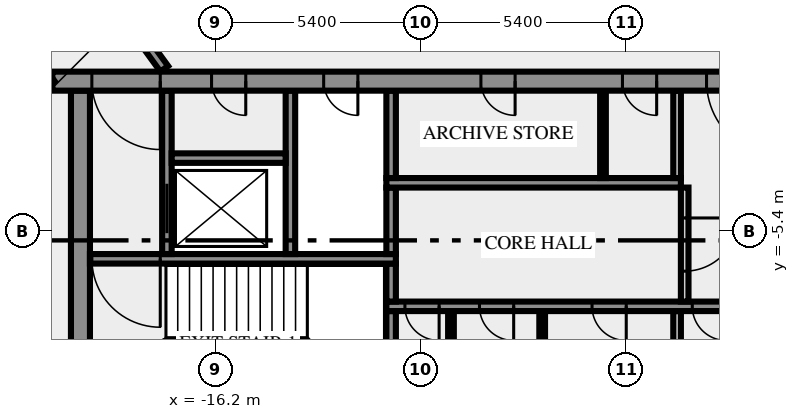
"""IFC4 building model, lengths in metres.
Left out: names, types, materials, properties, quantities, classifications, styles, units other than length and angle.
Written with IfcOpenShell. Run it as: python <this file> out.ifc"""

import sys

from ifc_helpers import new_model, si_unit, direction, frame, frame_2d, origin, place, context, subcontext, project, spatial, rectangle, extrude, element, fill, save


model = new_model("IFC4")
c1 = context("Model", 3, precision=1e-05, world=origin(), true_north=direction((0.0, 1.0)))
c2 = subcontext(c1, "Body", "Model", "MODEL_VIEW")
j1 = project(units=[si_unit("LENGTHUNIT", "METRE"), si_unit("PLANEANGLEUNIT", "RADIAN")], contexts=[c1])
p1 = place(None, origin())
s1 = spatial("IfcSite", under=j1, at=p1, CompositionType="ELEMENT")
p2 = place(p1, origin())
s2 = spatial("IfcBuilding", under=s1, at=p2, CompositionType="ELEMENT")
p3 = place(p2, frame((0.0, 0.0, 160.0)))
s3 = spatial("IfcBuildingStorey", under=s2, at=p3, CompositionType="ELEMENT", Elevation=160.0)
p4 = place(p3, frame((-19.75, -10.5, 0.0), z_axis=(0.0, 0.0, 1.0), x_axis=(0.0, 1.0, 0.0)))
e1 = element("IfcWall", 1, at=p4, inside=s3, PredefinedType="SHEAR", context=c2, shape_type="SweptSolid", body=[
    extrude(rectangle(XDim=8.8, YDim=0.5, at=frame_2d((4.4, 0.0))), origin(), (0.0, 0.0, 1.0), 3.65),
])
p5 = place(p3, frame((-11.575, -10.5, 0.0), z_axis=(0.0, 0.0, 1.0), x_axis=(0.0, 1.0, 0.0)))
e2 = element("IfcWall", 2, at=p5, inside=s3, PredefinedType="SHEAR", context=c2, shape_type="SweptSolid", body=[
    extrude(rectangle(XDim=3.0, YDim=0.25, at=frame_2d((1.5, 0.0))), origin(), (0.0, 0.0, 1.0), 3.65),
])
for number, where, z_axis, x_axis in (
    (3, (-10.0, -10.5, 0.0), (0.0, 0.0, 1.0), (0.0, 1.0, 0.0)),
    (4, (-7.6, -10.5, 0.0), (0.0, 0.0, 1.0), (0.0, 1.0, 0.0)),
):
    element("IfcWall", number, at=place(p3, frame(where, z_axis=z_axis, x_axis=x_axis)), inside=s3, PredefinedType="PARTITIONING", context=c2, shape_type="SweptSolid", body=[
        extrude(rectangle(XDim=3.0, YDim=0.15, at=frame_2d((1.5, 0.0))), origin(), (0.0, 0.0, 1.0), 3.65),
    ])
p6 = place(p3, frame((-4.05, -10.5, 0.0), z_axis=(0.0, 0.0, 1.0), x_axis=(0.0, 1.0, 0.0)))
e5 = element("IfcWall", 5, at=p6, inside=s3, PredefinedType="SOLIDWALL", context=c2, shape_type="SweptSolid", body=[
    extrude(rectangle(XDim=3.0, YDim=0.2, at=frame_2d((1.5, 0.0))), origin(), (0.0, 0.0, 1.0), 3.65),
])
p7 = place(p3, frame((11.7, -7.375, 0.0), z_axis=(0.0, 0.0, 1.0), x_axis=(-1.0, 0.0, 0.0)))
e6 = element("IfcWall", 6, at=p7, inside=s3, PredefinedType="SHEAR", context=c2, shape_type="SweptSolid", body=[
    extrude(rectangle(XDim=23.4, YDim=0.25, at=frame_2d((11.7, 0.0))), origin(), (0.0, 0.0, 1.0), 3.65),
])
p8 = place(p7, frame((22.012, 0.0, 0.0)))
e7 = element("IfcOpeningElement", 7, at=p8, cuts=e6, PredefinedType="OPENING", context=c2, shape_type="SweptSolid", body=[
    extrude(rectangle(XDim=0.9, YDim=2.1, at=frame_2d((0.45, 1.05))), frame((0.0, 0.135, 0.0), z_axis=(0.0, -1.0, 0.0), x_axis=(1.0, 0.0, 0.0)), (0.0, 0.0, 1.0), 0.27),
])
p9 = place(p7, frame((20.05, 0.0, 0.0)))
e8 = element("IfcOpeningElement", 8, at=p9, cuts=e6, PredefinedType="OPENING", context=c2, shape_type="SweptSolid", body=[
    extrude(rectangle(XDim=0.9, YDim=2.1, at=frame_2d((0.45, 1.05))), frame((0.0, 0.135, 0.0), z_axis=(0.0, -1.0, 0.0), x_axis=(1.0, 0.0, 0.0)), (0.0, 0.0, 1.0), 0.27),
])
p10 = place(p7, frame((17.088, 0.0, 0.0)))
e9 = element("IfcOpeningElement", 9, at=p10, cuts=e6, PredefinedType="OPENING", context=c2, shape_type="SweptSolid", body=[
    extrude(rectangle(XDim=0.9, YDim=2.1, at=frame_2d((0.45, 1.05))), frame((0.0, 0.135, 0.0), z_axis=(0.0, -1.0, 0.0), x_axis=(1.0, 0.0, 0.0)), (0.0, 0.0, 1.0), 0.27),
])
p11 = place(p7, frame((14.45, 0.0, 0.0)))
e10 = element("IfcOpeningElement", 10, at=p11, cuts=e6, PredefinedType="OPENING", context=c2, shape_type="SweptSolid", body=[
    extrude(rectangle(XDim=0.9, YDim=2.1, at=frame_2d((0.45, 1.05))), frame((0.0, 0.135, 0.0), z_axis=(0.0, -1.0, 0.0), x_axis=(1.0, 0.0, 0.0)), (0.0, 0.0, 1.0), 0.27),
])
p12 = place(p7, frame((12.95, 0.0, 0.0)))
e11 = element("IfcOpeningElement", 11, at=p12, cuts=e6, PredefinedType="OPENING", context=c2, shape_type="SweptSolid", body=[
    extrude(rectangle(XDim=0.9, YDim=2.1, at=frame_2d((0.45, 1.05))), frame((0.0, 0.135, 0.0), z_axis=(0.0, -1.0, 0.0), x_axis=(1.0, 0.0, 0.0)), (0.0, 0.0, 1.0), 0.27),
])
p13 = place(p7, frame((11.475, 0.0, 0.0)))
e12 = element("IfcOpeningElement", 12, at=p13, cuts=e6, PredefinedType="OPENING", context=c2, shape_type="SweptSolid", body=[
    extrude(rectangle(XDim=0.9, YDim=2.1, at=frame_2d((0.45, 1.05))), frame((0.0, 0.135, 0.0), z_axis=(0.0, -1.0, 0.0), x_axis=(1.0, 0.0, 0.0)), (0.0, 0.0, 1.0), 0.27),
])
p14 = place(p7, frame((10.45, 0.0, 0.0)))
e13 = element("IfcOpeningElement", 13, at=p14, cuts=e6, PredefinedType="OPENING", context=c2, shape_type="SweptSolid", body=[
    extrude(rectangle(XDim=0.5, YDim=2.1, at=frame_2d((0.25, 1.05))), frame((0.0, 0.135, 0.0), z_axis=(0.0, -1.0, 0.0), x_axis=(1.0, 0.0, 0.0)), (0.0, 0.0, 1.0), 0.27),
])
p15 = place(p7, frame((8.35, 0.0, 0.0)))
e14 = element("IfcOpeningElement", 14, at=p15, cuts=e6, PredefinedType="OPENING", context=c2, shape_type="SweptSolid", body=[
    extrude(rectangle(XDim=1.1, YDim=2.1, at=frame_2d((0.55, 1.05))), frame((0.0, 0.135, 0.0), z_axis=(0.0, -1.0, 0.0), x_axis=(1.0, 0.0, 0.0)), (0.0, 0.0, 1.0), 0.27),
])
p16 = place(p7, frame((5.85, 0.0, 0.0)))
e15 = element("IfcOpeningElement", 15, at=p16, cuts=e6, PredefinedType="OPENING", context=c2, shape_type="SweptSolid", body=[
    extrude(rectangle(XDim=1.1, YDim=2.1, at=frame_2d((0.55, 1.05))), frame((0.0, 0.135, 0.0), z_axis=(0.0, -1.0, 0.0), x_axis=(1.0, 0.0, 0.0)), (0.0, 0.0, 1.0), 0.27),
])
p17 = place(p7, frame((3.35, 0.0, 0.0)))
e16 = element("IfcOpeningElement", 16, at=p17, cuts=e6, PredefinedType="OPENING", context=c2, shape_type="SweptSolid", body=[
    extrude(rectangle(XDim=1.1, YDim=2.1, at=frame_2d((0.55, 1.05))), frame((0.0, 0.135, 0.0), z_axis=(0.0, -1.0, 0.0), x_axis=(1.0, 0.0, 0.0)), (0.0, 0.0, 1.0), 0.27),
])
p18 = place(p7, frame((0.85, 0.0, 0.0)))
e17 = element("IfcOpeningElement", 17, at=p18, cuts=e6, PredefinedType="OPENING", context=c2, shape_type="SweptSolid", body=[
    extrude(rectangle(XDim=1.1, YDim=2.1, at=frame_2d((0.55, 1.05))), frame((0.0, 0.135, 0.0), z_axis=(0.0, -1.0, 0.0), x_axis=(1.0, 0.0, 0.0)), (0.0, 0.0, 1.0), 0.27),
])
p19 = place(p3, frame((-11.575, -7.25, 0.0), z_axis=(0.0, 0.0, 1.0), x_axis=(0.0, 1.0, 0.0)))
e18 = element("IfcWall", 18, at=p19, inside=s3, PredefinedType="SHEAR", context=c2, shape_type="SweptSolid", body=[
    extrude(rectangle(XDim=1.0, YDim=0.25, at=frame_2d((0.5, 0.0))), origin(), (0.0, 0.0, 1.0), 3.65),
])
p20 = place(p3, frame((-3.85, -4.25, 0.0), z_axis=(0.0, 0.0, 1.0), x_axis=(0.0, -1.0, 0.0)))
e19 = element("IfcWall", 19, at=p20, inside=s3, PredefinedType="SOLIDWALL", context=c2, shape_type="SweptSolid", body=[
    extrude(rectangle(XDim=3.0, YDim=0.2, at=frame_2d((1.5, 0.0))), origin(), (0.0, 0.0, 1.0), 3.65),
])
p21 = place(p20, frame((0.8, 0.0, 0.0)))
e20 = element("IfcOpeningElement", 20, at=p21, cuts=e19, PredefinedType="OPENING", context=c2, shape_type="SweptSolid", body=[
    extrude(rectangle(XDim=1.4, YDim=2.1, at=frame_2d((0.7, 1.05))), frame((0.0, 0.11, 0.0), z_axis=(0.0, -1.0, 0.0), x_axis=(1.0, 0.0, 0.0)), (0.0, 0.0, 1.0), 0.22),
])
p22 = place(p3, frame((-11.45, -6.125, 0.0), z_axis=(0.0, 0.0, 1.0), x_axis=(-1.0, 0.0, 0.0)))
e21 = element("IfcWall", 21, at=p22, inside=s3, PredefinedType="SHEAR", context=c2, shape_type="SweptSolid", body=[
    extrude(rectangle(XDim=8.05, YDim=0.25, at=frame_2d((4.025, 0.0))), origin(), (0.0, 0.0, 1.0), 3.65),
])
p23 = place(p22, frame((6.2, 0.0, 0.0)))
e22 = element("IfcOpeningElement", 22, at=p23, cuts=e21, PredefinedType="OPENING", context=c2, shape_type="SweptSolid", body=[
    extrude(rectangle(XDim=1.8, YDim=2.1, at=frame_2d((0.9, 1.05))), frame((0.0, 0.135, 0.0), z_axis=(0.0, -1.0, 0.0), x_axis=(1.0, 0.0, 0.0)), (0.0, 0.0, 1.0), 0.27),
])
p24 = place(p3, frame((-17.475, -6.0, 0.0), z_axis=(0.0, 0.0, 1.0), x_axis=(0.0, 1.0, 0.0)))
e23 = element("IfcWall", 23, at=p24, inside=s3, PredefinedType="SHEAR", context=c2, shape_type="SweptSolid", body=[
    extrude(rectangle(XDim=4.3, YDim=0.25, at=frame_2d((2.15, 0.0))), origin(), (0.0, 0.0, 1.0), 3.65),
])
p25 = place(p24, frame((0.55, 0.0, 0.0)))
e24 = element("IfcOpeningElement", 24, at=p25, cuts=e23, PredefinedType="OPENING", context=c2, shape_type="SweptSolid", body=[
    extrude(rectangle(XDim=1.3, YDim=2.1, at=frame_2d((0.65, 1.05))), frame((0.0, 0.135, 0.0), z_axis=(0.0, -1.0, 0.0), x_axis=(1.0, 0.0, 0.0)), (0.0, 0.0, 1.0), 0.27),
])
p26 = place(p3, frame((-14.225, -6.0, 0.0), z_axis=(0.0, 0.0, 1.0), x_axis=(0.0, 1.0, 0.0)))
e25 = element("IfcWall", 25, at=p26, inside=s3, PredefinedType="SHEAR", context=c2, shape_type="SweptSolid", body=[
    extrude(rectangle(XDim=4.3, YDim=0.25, at=frame_2d((2.15, 0.0))), origin(), (0.0, 0.0, 1.0), 3.65),
])
p27 = place(p3, frame((-11.575, -6.0, 0.0), z_axis=(0.0, 0.0, 1.0), x_axis=(0.0, 1.0, 0.0)))
e26 = element("IfcWall", 26, at=p27, inside=s3, PredefinedType="SHEAR", context=c2, shape_type="SweptSolid", body=[
    extrude(rectangle(XDim=1.75, YDim=0.25, at=frame_2d((0.875, 0.0))), origin(), (0.0, 0.0, 1.0), 3.65),
])
p28 = place(p3, frame((-11.7, -4.125, 0.0), z_axis=(0.0, 0.0, 1.0), x_axis=(1.0, 0.0, 0.0)))
e27 = element("IfcWall", 27, at=p28, inside=s3, PredefinedType="SHEAR", context=c2, shape_type="SweptSolid", body=[
    extrude(rectangle(XDim=7.75, YDim=0.25, at=frame_2d((3.875, 0.0))), origin(), (0.0, 0.0, 1.0), 3.65),
])
p29 = place(p3, frame((-11.575, -4.0, 0.0), z_axis=(0.0, 0.0, 1.0), x_axis=(0.0, 1.0, 0.0)))
e28 = element("IfcWall", 28, at=p29, inside=s3, PredefinedType="SHEAR", context=c2, shape_type="SweptSolid", body=[
    extrude(rectangle(XDim=2.3, YDim=0.25, at=frame_2d((1.15, 0.0))), origin(), (0.0, 0.0, 1.0), 3.65),
])
p30 = place(p3, frame((-6.0, -4.0, 0.0), z_axis=(0.0, 0.0, 1.0), x_axis=(0.0, 1.0, 0.0)))
e29 = element("IfcWall", 29, at=p30, inside=s3, PredefinedType="PARTITIONING", context=c2, shape_type="SweptSolid", body=[
    extrude(rectangle(XDim=2.3, YDim=0.15, at=frame_2d((1.15, 0.0))), origin(), (0.0, 0.0, 1.0), 3.65),
])
p31 = place(p3, frame((-4.05, -4.0, 0.0), z_axis=(0.0, 0.0, 1.0), x_axis=(0.0, 1.0, 0.0)))
e30 = element("IfcWall", 30, at=p31, inside=s3, PredefinedType="SOLIDWALL", context=c2, shape_type="SweptSolid", body=[
    extrude(rectangle(XDim=2.3, YDim=0.2, at=frame_2d((1.15, 0.0))), origin(), (0.0, 0.0, 1.0), 3.65),
])
p32 = place(p3, frame((-17.35, -3.475, 0.0), z_axis=(0.0, 0.0, 1.0), x_axis=(1.0, 0.0, 0.0)))
e31 = element("IfcWall", 31, at=p32, inside=s3, PredefinedType="SHEAR", context=c2, shape_type="SweptSolid", body=[
    extrude(rectangle(XDim=3.0, YDim=0.25, at=frame_2d((1.5, 0.0))), origin(), (0.0, 0.0, 1.0), 3.65),
])
p33 = place(p3, frame((20.49, -1.45, 0.0), z_axis=(0.0, 0.0, 1.0), x_axis=(-1.0, 0.0, 0.0)))
e32 = element("IfcWall", 32, at=p33, inside=s3, PredefinedType="SHEAR", context=c2, shape_type="SweptSolid", body=[
    extrude(rectangle(XDim=40.98, YDim=0.5, at=frame_2d((20.49, 0.0))), origin(), (0.0, 0.0, 1.0), 3.65),
])
p34 = place(p33, frame((38.14, 0.0, 0.0)))
e33 = element("IfcOpeningElement", 33, at=p34, cuts=e32, PredefinedType="OPENING", context=c2, shape_type="SweptSolid", body=[
    extrude(rectangle(XDim=1.8, YDim=2.1, at=frame_2d((0.9, 1.05))), frame((0.0, 0.26, 0.0), z_axis=(0.0, -1.0, 0.0), x_axis=(1.0, 0.0, 0.0)), (0.0, 0.0, 1.0), 0.52),
])
p35 = place(p33, frame((35.89, 0.0, 0.0)))
e34 = element("IfcOpeningElement", 34, at=p35, cuts=e32, PredefinedType="OPENING", context=c2, shape_type="SweptSolid", body=[
    extrude(rectangle(XDim=0.9, YDim=2.1, at=frame_2d((0.45, 1.05))), frame((0.0, 0.26, 0.0), z_axis=(0.0, -1.0, 0.0), x_axis=(1.0, 0.0, 0.0)), (0.0, 0.0, 1.0), 0.52),
])
p36 = place(p33, frame((32.94, 0.0, 0.0)))
e35 = element("IfcOpeningElement", 35, at=p36, cuts=e32, PredefinedType="OPENING", context=c2, shape_type="SweptSolid", body=[
    extrude(rectangle(XDim=0.9, YDim=2.1, at=frame_2d((0.45, 1.05))), frame((0.0, 0.26, 0.0), z_axis=(0.0, -1.0, 0.0), x_axis=(1.0, 0.0, 0.0)), (0.0, 0.0, 1.0), 0.52),
])
p37 = place(p33, frame((28.802, 0.0, 0.0)))
e36 = element("IfcOpeningElement", 36, at=p37, cuts=e32, PredefinedType="OPENING", context=c2, shape_type="SweptSolid", body=[
    extrude(rectangle(XDim=0.9, YDim=2.1, at=frame_2d((0.45, 1.05))), frame((0.0, 0.26, 0.0), z_axis=(0.0, -1.0, 0.0), x_axis=(1.0, 0.0, 0.0)), (0.0, 0.0, 1.0), 0.52),
])
p38 = place(p33, frame((25.077, 0.0, 0.0)))
e37 = element("IfcOpeningElement", 37, at=p38, cuts=e32, PredefinedType="OPENING", context=c2, shape_type="SweptSolid", body=[
    extrude(rectangle(XDim=0.9, YDim=2.1, at=frame_2d((0.45, 1.05))), frame((0.0, 0.26, 0.0), z_axis=(0.0, -1.0, 0.0), x_axis=(1.0, 0.0, 0.0)), (0.0, 0.0, 1.0), 0.52),
])
p39 = place(p33, frame((21.765, 0.0, 0.0)))
e38 = element("IfcOpeningElement", 38, at=p39, cuts=e32, PredefinedType="OPENING", context=c2, shape_type="SweptSolid", body=[
    extrude(rectangle(XDim=2.0, YDim=2.1, at=frame_2d((1.0, 1.05))), frame((0.0, 0.26, 0.0), z_axis=(0.0, -1.0, 0.0), x_axis=(1.0, 0.0, 0.0)), (0.0, 0.0, 1.0), 0.52),
])
p40 = place(p33, frame((7.14, 0.0, 0.0)))
e39 = element("IfcOpeningElement", 39, at=p40, cuts=e32, PredefinedType="OPENING", context=c2, shape_type="SweptSolid", body=[
    extrude(rectangle(XDim=0.9, YDim=2.1, at=frame_2d((0.45, 1.05))), frame((0.0, 0.26, 0.0), z_axis=(0.0, -1.0, 0.0), x_axis=(1.0, 0.0, 0.0)), (0.0, 0.0, 1.0), 0.52),
])
p41 = place(p33, frame((5.028, 0.0, 0.0)))
e40 = element("IfcOpeningElement", 40, at=p41, cuts=e32, PredefinedType="OPENING", context=c2, shape_type="SweptSolid", body=[
    extrude(rectangle(XDim=0.8, YDim=2.1, at=frame_2d((0.4, 1.05))), frame((0.0, 0.26, 0.0), z_axis=(0.0, -1.0, 0.0), x_axis=(1.0, 0.0, 0.0)), (0.0, 0.0, 1.0), 0.52),
])
p42 = place(p33, frame((3.452, 0.0, 0.0)))
e41 = element("IfcOpeningElement", 41, at=p42, cuts=e32, PredefinedType="OPENING", context=c2, shape_type="SweptSolid", body=[
    extrude(rectangle(XDim=0.8, YDim=2.1, at=frame_2d((0.4, 1.05))), frame((0.0, 0.26, 0.0), z_axis=(0.0, -1.0, 0.0), x_axis=(1.0, 0.0, 0.0)), (0.0, 0.0, 1.0), 0.52),
])
p43 = place(p33, frame((1.04, 0.0, 0.0)))
e42 = element("IfcOpeningElement", 42, at=p43, cuts=e32, PredefinedType="OPENING", context=c2, shape_type="SweptSolid", body=[
    extrude(rectangle(XDim=1.8, YDim=2.1, at=frame_2d((0.9, 1.05))), frame((0.0, 0.26, 0.0), z_axis=(0.0, -1.0, 0.0), x_axis=(1.0, 0.0, 0.0)), (0.0, 0.0, 1.0), 0.52),
])
p44 = place(p3, frame((-20.531, -1.523, 0.0), z_axis=(0.0, 0.0, 1.0), x_axis=(-0.587781654618, 0.809019608226, 0.0)))
e43 = element("IfcWall", 43, at=p44, inside=s3, PredefinedType="SOLIDWALL", context=c2, shape_type="SweptSolid", body=[
    extrude(rectangle(XDim=33.911, YDim=0.25, at=frame_2d((16.956, 0.0))), origin(), (0.0, 0.0, 1.0), 3.65),
])
p45 = place(p44, frame((19.743, 0.0, 0.0)))
e44 = element("IfcOpeningElement", 44, at=p45, cuts=e43, PredefinedType="OPENING", context=c2, shape_type="SweptSolid", body=[
    extrude(rectangle(XDim=1.8, YDim=2.1, at=frame_2d((0.9, 1.05))), frame((0.0, 0.135, 0.0), z_axis=(0.0, -1.0, 0.0), x_axis=(1.0, 0.0, 0.0)), (0.0, 0.0, 1.0), 0.27),
])
p46 = place(p44, frame((0.533, 0.0, 0.0)))
e45 = element("IfcOpeningElement", 45, at=p46, cuts=e43, PredefinedType="OPENING", context=c2, shape_type="SweptSolid", body=[
    extrude(rectangle(XDim=0.9, YDim=2.1, at=frame_2d((0.45, 1.05))), frame((0.0, 0.135, 0.0), z_axis=(0.0, -1.0, 0.0), x_axis=(1.0, 0.0, 0.0)), (0.0, 0.0, 1.0), 0.27),
])
p47 = place(p3, frame((-38.32, 27.469, 0.0), z_axis=(0.0, 0.0, 1.0), x_axis=(0.587788021768, -0.809014982226, 0.0)))
e46 = element("IfcWall", 46, at=p47, inside=s3, PredefinedType="SOLIDWALL", context=c2, shape_type="SweptSolid", body=[
    extrude(rectangle(XDim=35.344, YDim=0.25, at=frame_2d((17.672, 0.0))), origin(), (0.0, 0.0, 1.0), 3.65),
])
p48 = place(p47, frame((31.003, 0.0, 0.0)))
e47 = element("IfcOpeningElement", 47, at=p48, cuts=e46, PredefinedType="OPENING", context=c2, shape_type="SweptSolid", body=[
    extrude(rectangle(XDim=0.9, YDim=2.1, at=frame_2d((0.45, 1.05))), frame((0.0, 0.135, 0.0), z_axis=(0.0, -1.0, 0.0), x_axis=(1.0, 0.0, 0.0)), (0.0, 0.0, 1.0), 0.27),
])
p49 = place(p47, frame((16.687, 0.0, 0.0)))
e48 = element("IfcOpeningElement", 48, at=p49, cuts=e46, PredefinedType="OPENING", context=c2, shape_type="SweptSolid", body=[
    extrude(rectangle(XDim=0.9, YDim=2.1, at=frame_2d((0.45, 1.05))), frame((0.0, 0.135, 0.0), z_axis=(0.0, -1.0, 0.0), x_axis=(1.0, 0.0, 0.0)), (0.0, 0.0, 1.0), 0.27),
])
p50 = place(p8, origin())
e49 = element("IfcDoor", 49, at=p50, inside=s3, OperationType="SINGLE_SWING_RIGHT", PredefinedType="DOOR", context=c2, shape_type="SweptSolid", body=[
    extrude(rectangle(XDim=0.9, YDim=2.1, at=frame_2d((0.45, 1.05))), frame((0.0, 0.025, 0.0), z_axis=(0.0, -1.0, 0.0), x_axis=(1.0, 0.0, 0.0)), (0.0, 0.0, 1.0), 0.05),
])
fill(e7, e49)
p51 = place(p9, origin())
e50 = element("IfcDoor", 50, at=p51, inside=s3, OperationType="SINGLE_SWING_RIGHT", PredefinedType="DOOR", context=c2, shape_type="SweptSolid", body=[
    extrude(rectangle(XDim=0.9, YDim=2.1, at=frame_2d((0.45, 1.05))), frame((0.0, 0.025, 0.0), z_axis=(0.0, -1.0, 0.0), x_axis=(1.0, 0.0, 0.0)), (0.0, 0.0, 1.0), 0.05),
])
fill(e8, e50)
p52 = place(p10, origin())
e51 = element("IfcDoor", 51, at=p52, inside=s3, OperationType="SINGLE_SWING_RIGHT", PredefinedType="DOOR", context=c2, shape_type="SweptSolid", body=[
    extrude(rectangle(XDim=0.9, YDim=2.1, at=frame_2d((0.45, 1.05))), frame((0.0, 0.025, 0.0), z_axis=(0.0, -1.0, 0.0), x_axis=(1.0, 0.0, 0.0)), (0.0, 0.0, 1.0), 0.05),
])
fill(e9, e51)
p53 = place(p11, origin())
e52 = element("IfcDoor", 52, at=p53, inside=s3, OperationType="SINGLE_SWING_RIGHT", PredefinedType="DOOR", context=c2, shape_type="SweptSolid", body=[
    extrude(rectangle(XDim=0.9, YDim=2.1, at=frame_2d((0.45, 1.05))), frame((0.0, 0.025, 0.0), z_axis=(0.0, -1.0, 0.0), x_axis=(1.0, 0.0, 0.0)), (0.0, 0.0, 1.0), 0.05),
])
fill(e10, e52)
p54 = place(p21, origin())
e53 = element("IfcDoor", 53, at=p54, inside=s3, OperationType="DOUBLE_DOOR_SINGLE_SWING", PredefinedType="DOOR", context=c2, shape_type="SweptSolid", body=[
    extrude(rectangle(XDim=1.4, YDim=2.1, at=frame_2d((0.7, 1.05))), frame((0.0, 0.025, 0.0), z_axis=(0.0, -1.0, 0.0), x_axis=(1.0, 0.0, 0.0)), (0.0, 0.0, 1.0), 0.05),
])
fill(e20, e53)
p55 = place(p23, origin())
e54 = element("IfcDoor", 54, at=p55, inside=s3, OperationType="DOUBLE_DOOR_SINGLE_SWING", PredefinedType="DOOR", context=c2, shape_type="SweptSolid", body=[
    extrude(rectangle(XDim=1.8, YDim=2.1, at=frame_2d((0.9, 1.05))), frame((0.0, 0.025, 0.0), z_axis=(0.0, -1.0, 0.0), x_axis=(1.0, 0.0, 0.0)), (0.0, 0.0, 1.0), 0.05),
])
fill(e22, e54)
p56 = place(p25, origin())
e55 = element("IfcDoor", 55, at=p56, inside=s3, OperationType="DOUBLE_DOOR_SLIDING", PredefinedType="DOOR", context=c2, shape_type="SweptSolid", body=[
    extrude(rectangle(XDim=1.3, YDim=2.1, at=frame_2d((0.65, 1.05))), frame((0.0, 0.025, 0.0), z_axis=(0.0, -1.0, 0.0), x_axis=(1.0, 0.0, 0.0)), (0.0, 0.0, 1.0), 0.05),
])
fill(e24, e55)
p57 = place(p34, origin())
e56 = element("IfcDoor", 56, at=p57, inside=s3, OperationType="DOUBLE_DOOR_SINGLE_SWING", PredefinedType="DOOR", context=c2, shape_type="SweptSolid", body=[
    extrude(rectangle(XDim=1.8, YDim=2.1, at=frame_2d((0.9, 1.05))), frame((0.0, 0.025, 0.0), z_axis=(0.0, -1.0, 0.0), x_axis=(1.0, 0.0, 0.0)), (0.0, 0.0, 1.0), 0.05),
])
fill(e33, e56)
p58 = place(p35, origin())
e57 = element("IfcDoor", 57, at=p58, inside=s3, OperationType="SINGLE_SWING_RIGHT", PredefinedType="DOOR", context=c2, shape_type="SweptSolid", body=[
    extrude(rectangle(XDim=0.9, YDim=2.1, at=frame_2d((0.45, 1.05))), frame((0.0, 0.025, 0.0), z_axis=(0.0, -1.0, 0.0), x_axis=(1.0, 0.0, 0.0)), (0.0, 0.0, 1.0), 0.05),
])
fill(e34, e57)
p59 = place(p36, origin())
e58 = element("IfcDoor", 58, at=p59, inside=s3, OperationType="SINGLE_SWING_RIGHT", PredefinedType="DOOR", context=c2, shape_type="SweptSolid", body=[
    extrude(rectangle(XDim=0.9, YDim=2.1, at=frame_2d((0.45, 1.05))), frame((0.0, 0.025, 0.0), z_axis=(0.0, -1.0, 0.0), x_axis=(1.0, 0.0, 0.0)), (0.0, 0.0, 1.0), 0.05),
])
fill(e35, e58)
p60 = place(p37, origin())
e59 = element("IfcDoor", 59, at=p60, inside=s3, OperationType="SINGLE_SWING_RIGHT", PredefinedType="DOOR", context=c2, shape_type="SweptSolid", body=[
    extrude(rectangle(XDim=0.9, YDim=2.1, at=frame_2d((0.45, 1.05))), frame((0.0, 0.025, 0.0), z_axis=(0.0, -1.0, 0.0), x_axis=(1.0, 0.0, 0.0)), (0.0, 0.0, 1.0), 0.05),
])
fill(e36, e59)
p61 = place(p38, origin())
e60 = element("IfcDoor", 60, at=p61, inside=s3, OperationType="SINGLE_SWING_RIGHT", PredefinedType="DOOR", context=c2, shape_type="SweptSolid", body=[
    extrude(rectangle(XDim=0.9, YDim=2.1, at=frame_2d((0.45, 1.05))), frame((0.0, 0.025, 0.0), z_axis=(0.0, -1.0, 0.0), x_axis=(1.0, 0.0, 0.0)), (0.0, 0.0, 1.0), 0.05),
])
fill(e37, e60)
p62 = place(p39, origin())
e61 = element("IfcDoor", 61, at=p62, inside=s3, OperationType="DOUBLE_DOOR_SINGLE_SWING", PredefinedType="DOOR", context=c2, shape_type="SweptSolid", body=[
    extrude(rectangle(XDim=2.0, YDim=2.1, at=frame_2d((1.0, 1.05))), frame((0.0, 0.025, 0.0), z_axis=(0.0, -1.0, 0.0), x_axis=(1.0, 0.0, 0.0)), (0.0, 0.0, 1.0), 0.05),
])
fill(e38, e61)
save(model, sys.argv[1])
